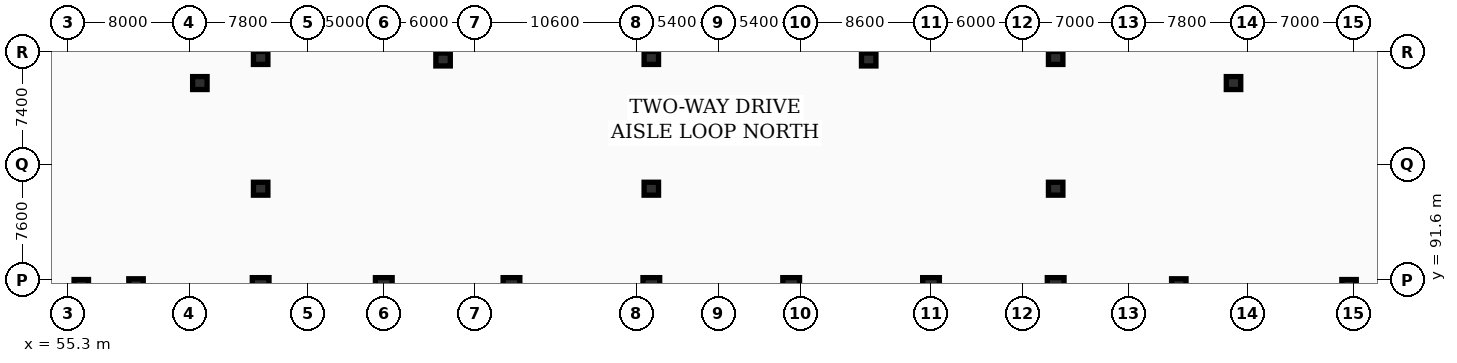
"""IFC4 building model, lengths in metres.
Left out: names, types, materials, properties, quantities, classifications, styles, units other than length and angle.
Written with IfcOpenShell. Run it as: python <this file> out.ifc"""

import sys

from ifc_helpers import new_model, si_unit, direction, frame, origin, origin_2d, place, context, subcontext, project, spatial, rectangle, circle, extrude, element, save


model = new_model("IFC4")
c1 = context("Model", 3, precision=1e-05, world=origin(), true_north=direction((0.0, 1.0)))
c2 = subcontext(c1, "Body", "Model", "MODEL_VIEW")
j1 = project(units=[si_unit("LENGTHUNIT", "METRE"), si_unit("PLANEANGLEUNIT", "RADIAN")], contexts=[c1])
p1 = place(None, origin())
s1 = spatial("IfcSite", under=j1, at=p1, CompositionType="ELEMENT")
p2 = place(p1, origin())
s2 = spatial("IfcBuilding", under=s1, at=p2, CompositionType="ELEMENT")
p3 = place(p2, frame((0.0, 0.0, -10.8)))
s3 = spatial("IfcBuildingStorey", under=s2, at=p3, CompositionType="ELEMENT", Elevation=-10.8)
p4 = place(p3, frame((59.8, 91.2, -0.45), z_axis=(0.0, 0.0, 1.0), x_axis=(1.0, 0.0, 0.0)))
e1 = element("IfcColumn", 1, at=p4, inside=s3, PredefinedType="COLUMN", context=c2, shape_type="SweptSolid", body=[
    extrude(circle(Radius=0.475, at=origin_2d()), origin(), (0.0, 0.0, 1.0), 4.05),
])
for number, where, z_axis, x_axis in (
    (2, (68.0, 91.2, -0.45), (0.0, 0.0, 1.0), (1.0, 0.0, 0.0)),
    (3, (76.1, 91.2, -0.45), (0.0, 0.0, 1.0), (1.0, 0.0, 0.0)),
    (4, (84.5, 91.2, -0.45), (0.0, 0.0, 1.0), (1.0, 0.0, 0.0)),
    (5, (93.7, 91.2, -0.45), (0.0, 0.0, 1.0), (1.0, 0.0, 0.0)),
    (6, (102.9, 91.2, -0.45), (0.0, 0.0, 1.0), (1.0, 0.0, 0.0)),
    (7, (112.1, 91.2, -0.45), (0.0, 0.0, 1.0), (1.0, 0.0, 0.0)),
    (8, (120.3, 91.2, -0.45), (0.0, 0.0, 1.0), (1.0, 0.0, 0.0)),
):
    element("IfcColumn", number, at=place(p3, frame(where, z_axis=z_axis, x_axis=x_axis)), inside=s3, PredefinedType="COLUMN", context=c2, shape_type="SweptSolid", body=[
        extrude(rectangle(XDim=1.1, YDim=1.1, at=origin_2d()), origin(), (0.0, 0.0, 1.0), 4.05),
    ])
p5 = place(p3, frame((128.4, 91.2, -0.45), z_axis=(0.0, 0.0, 1.0), x_axis=(1.0, 0.0, 0.0)))
e9 = element("IfcColumn", 9, at=p5, inside=s3, PredefinedType="COLUMN", context=c2, shape_type="SweptSolid", body=[
    extrude(circle(Radius=0.475, at=origin_2d()), origin(), (0.0, 0.0, 1.0), 4.05),
])
for number, where, z_axis, x_axis in (
    (10, (56.2, 91.2, -0.45), (0.0, 0.0, 1.0), (1.0, 0.0, 0.0)),
    (11, (139.6, 91.2, -0.45), (0.0, 0.0, 1.0), (1.0, 0.0, 0.0)),
    (12, (68.0, 97.6, -0.45), (0.0, 0.0, 1.0), (1.0, 0.0, 0.0)),
    (13, (93.7, 97.6, -0.45), (0.0, 0.0, 1.0), (1.0, 0.0, 0.0)),
    (14, (120.3, 97.6, -0.45), (0.0, 0.0, 1.0), (1.0, 0.0, 0.0)),
    (15, (80.0, 106.1, -0.45), (0.0, 0.0, 1.0), (1.0, 0.0, 0.0)),
    (16, (108.0, 106.1, -0.45), (0.0, 0.0, 1.0), (1.0, 0.0, 0.0)),
    (17, (64.0, 104.55, -0.45), (0.0, 0.0, 1.0), (1.0, 0.0, 0.0)),
    (18, (132.0, 104.55, -0.45), (0.0, 0.0, 1.0), (1.0, 0.0, 0.0)),
    (19, (68.0, 106.2, -0.45), (0.0, 0.0, 1.0), (1.0, 0.0, 0.0)),
    (20, (93.7, 106.2, -0.45), (0.0, 0.0, 1.0), (1.0, 0.0, 0.0)),
    (21, (120.3, 106.2, -0.45), (0.0, 0.0, 1.0), (1.0, 0.0, 0.0)),
):
    element("IfcColumn", number, at=place(p3, frame(where, z_axis=z_axis, x_axis=x_axis)), inside=s3, PredefinedType="COLUMN", context=c2, shape_type="SweptSolid", body=[
        extrude(rectangle(XDim=0.95, YDim=0.85, at=origin_2d()), origin(), (0.0, 0.0, 1.0), 4.05),
    ])
save(model, sys.argv[1])
